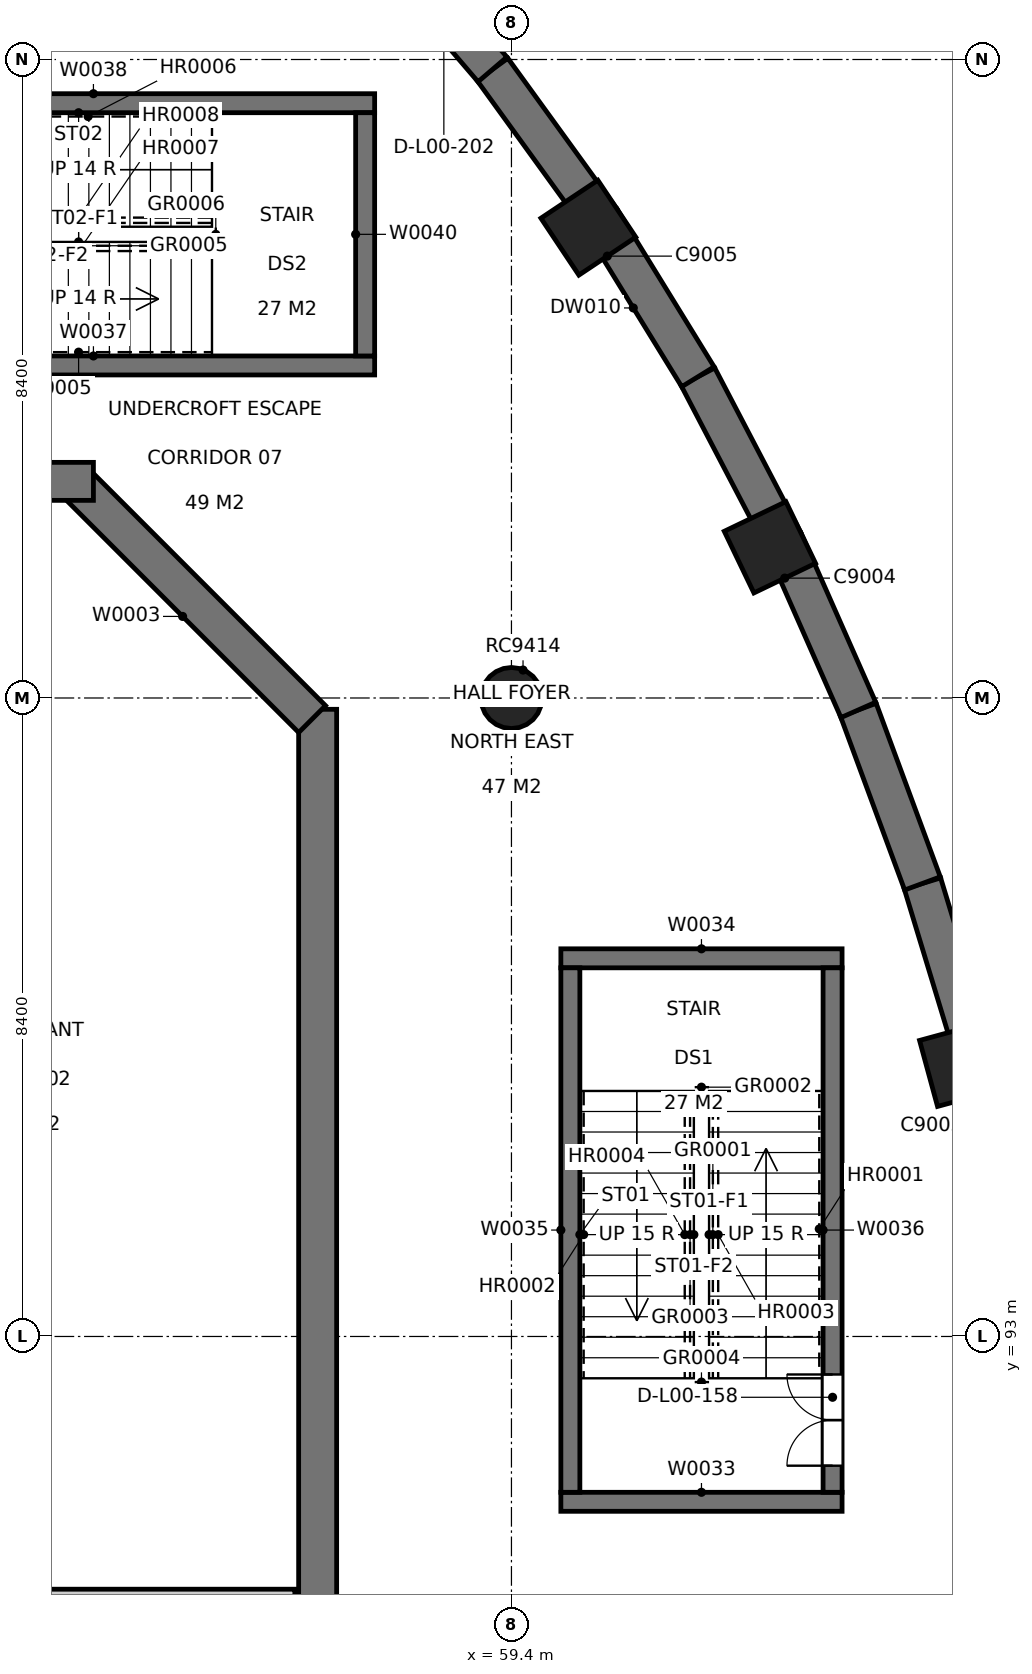
"""IFC4 building model, lengths in metres.
Left out: names, types, materials, properties, quantities, classifications, styles, units other than length and angle.
Written with IfcOpenShell. Run it as: python <this file> out.ifc"""

import sys

from ifc_helpers import new_model, si_unit, direction, frame, frame_2d, origin, origin_2d, place, context, subcontext, project, spatial, rectangle, circle, extrude, element, fill, save


model = new_model("IFC4")
c1 = context("Model", 3, precision=1e-05, world=origin(), true_north=direction((0.0, 1.0)))
c2 = subcontext(c1, "Body", "Model", "MODEL_VIEW")
j1 = project(units=[si_unit("LENGTHUNIT", "METRE"), si_unit("PLANEANGLEUNIT", "RADIAN")], contexts=[c1])
p1 = place(None, origin())
s1 = spatial("IfcSite", under=j1, at=p1, CompositionType="ELEMENT")
p2 = place(p1, origin())
s2 = spatial("IfcBuilding", under=s1, at=p2, CompositionType="ELEMENT")
p3 = place(p2, origin())
s3 = spatial("IfcBuildingStorey", under=s2, at=p3, CompositionType="ELEMENT", Elevation=0.0)
for number, where, z_axis, x_axis in (
    (1, (65.515, 96.631, 0.0), (0.0, 0.0, 1.0), (-0.291, 0.957, 0.0)),
    (2, (64.808, 98.96, 0.0), (0.0, 0.0, 1.0), (-0.347, 0.938, 0.0)),
):
    element("IfcWall", number, at=place(p3, frame(where, z_axis=z_axis, x_axis=x_axis)), inside=s3, PredefinedType="SOLIDWALL", context=c2, shape_type="SweptSolid", body=[
        extrude(rectangle(XDim=2.434, YDim=0.5, at=frame_2d((1.217, 0.0))), origin(), (0.0, 0.0, 1.0), 4.8),
    ])
p4 = place(p3, frame((63.964, 101.243, 0.0), z_axis=(0.0, 0.0, 1.0), x_axis=(-0.404089673612, 0.914719375371, 0.0)))
e3 = element("IfcWall", 3, at=p4, inside=s3, PredefinedType="SOLIDWALL", context=c2, shape_type="SweptSolid", body=[
    extrude(rectangle(XDim=2.434, YDim=0.5, at=frame_2d((1.217, 0.0))), origin(), (0.0, 0.0, 1.0), 4.8),
])
p5 = place(p3, frame((62.981, 103.469, 0.0), z_axis=(0.0, 0.0, 1.0), x_axis=(-0.463152141842, 0.886278789945, 0.0)))
e4 = element("IfcWall", 4, at=p5, inside=s3, PredefinedType="SOLIDWALL", context=c2, shape_type="SweptSolid", body=[
    extrude(rectangle(XDim=2.434, YDim=0.5, at=frame_2d((1.217, 0.0))), origin(), (0.0, 0.0, 1.0), 4.8),
])
p6 = place(p3, frame((61.854, 105.626, 0.0), z_axis=(0.0, 0.0, 1.0), x_axis=(-0.524097425664, 0.851658316705, 0.0)))
e5 = element("IfcWall", 5, at=p6, inside=s3, PredefinedType="SOLIDWALL", context=c2, shape_type="SweptSolid", body=[
    extrude(rectangle(XDim=2.434, YDim=0.5, at=frame_2d((1.217, 0.0))), origin(), (0.0, 0.0, 1.0), 4.8),
])
p7 = place(p3, frame((60.578, 107.699, 0.0), z_axis=(0.0, 0.0, 1.0), x_axis=(-0.586643688245, 0.809845159918, 0.0)))
e6 = element("IfcWall", 6, at=p7, inside=s3, PredefinedType="SOLIDWALL", context=c2, shape_type="SweptSolid", body=[
    extrude(rectangle(XDim=2.434, YDim=0.5, at=frame_2d((1.217, 0.0))), origin(), (0.0, 0.0, 1.0), 4.8),
])
p8 = place(p3, frame((59.15, 109.67, 0.0), z_axis=(0.0, 0.0, 1.0), x_axis=(-0.650526940133, 0.759483179643, 0.0)))
e7 = element("IfcWall", 7, at=p8, inside=s3, PredefinedType="SOLIDWALL", context=c2, shape_type="SweptSolid", body=[
    extrude(rectangle(XDim=2.433, YDim=0.5, at=frame_2d((1.217, 0.0))), origin(), (0.0, 0.0, 1.0), 4.8),
])
p9 = place(p8, frame((2.333, 0.0, 0.0), z_axis=(0.0, 0.0, 1.0), x_axis=(-1.0, 0.0, 0.0)))
e8 = element("IfcOpeningElement", 8, at=p9, cuts=e7, PredefinedType="OPENING", context=c2, shape_type="SweptSolid", body=[
    extrude(rectangle(XDim=1.8, YDim=2.1, at=frame_2d((0.9, 1.05))), frame((0.0, 0.26, 0.0), z_axis=(0.0, -1.0, 0.0), x_axis=(1.0, 0.0, 0.0)), (0.0, 0.0, 1.0), 0.52),
])
for number, where, z_axis, x_axis in (
    (9, (65.322, 96.579, 0.0), (0.0, 0.0, 1.0), (0.965, 0.263, 0.0)),
    (10, (62.801, 103.383, 0.0), (0.0, 0.0, 1.0), (0.901, 0.433, 0.0)),
    (11, (60.412, 107.588, 0.0), (0.0, 0.0, 1.0), (0.832, 0.555, 0.0)),
):
    element("IfcColumn", number, at=place(p3, frame(where, z_axis=z_axis, x_axis=x_axis)), inside=s3, PredefinedType="COLUMN", context=c2, shape_type="SweptSolid", body=[
        extrude(rectangle(XDim=0.9, YDim=0.9, at=origin_2d()), origin(), (0.0, 0.0, 1.0), 4.8),
    ])
p10 = place(p3, frame((59.4, 101.4, 0.0), z_axis=(0.0, 0.0, 1.0), x_axis=(1.0, 0.0, 0.0)))
e12 = element("IfcColumn", 12, at=p10, inside=s3, PredefinedType="COLUMN", context=c2, shape_type="SweptSolid", body=[
    extrude(circle(Radius=0.4, at=origin_2d()), origin(), (0.0, 0.0, 1.0), 4.8),
])
p11 = place(p3, frame((56.85, 63.1, 0.0), z_axis=(0.0, 0.0, 1.0), x_axis=(0.0, 1.0, 0.0)))
e13 = element("IfcWall", 13, at=p11, inside=s3, PredefinedType="SOLIDWALL", context=c2, shape_type="SweptSolid", body=[
    extrude(rectangle(XDim=38.151, YDim=0.5, at=frame_2d((19.076, 0.0))), origin(), (0.0, 0.0, 1.0), 4.8),
])
p12 = place(p11, frame((2.814, 0.0, 0.0)))
e14 = element("IfcOpeningElement", 14, at=p12, cuts=e13, PredefinedType="OPENING", context=c2, shape_type="SweptSolid", body=[
    extrude(rectangle(XDim=2.4, YDim=2.4, at=frame_2d((1.2, 1.2))), frame((0.0, 0.26, 0.0), z_axis=(0.0, -1.0, 0.0), x_axis=(1.0, 0.0, 0.0)), (0.0, 0.0, 1.0), 0.52),
])
p13 = place(p11, frame((6.402, 0.0, 0.0)))
e15 = element("IfcOpeningElement", 15, at=p13, cuts=e13, PredefinedType="OPENING", context=c2, shape_type="SweptSolid", body=[
    extrude(rectangle(XDim=2.4, YDim=2.4, at=frame_2d((1.2, 1.2))), frame((0.0, 0.26, 0.0), z_axis=(0.0, -1.0, 0.0), x_axis=(1.0, 0.0, 0.0)), (0.0, 0.0, 1.0), 0.52),
])
p14 = place(p3, frame((56.777, 101.123, 0.0), z_axis=(0.0, 0.0, 1.0), x_axis=(-0.707106781187, 0.707106781187, 0.0)))
e16 = element("IfcWall", 16, at=p14, inside=s3, PredefinedType="SOLIDWALL", context=c2, shape_type="SweptSolid", body=[
    extrude(rectangle(XDim=4.32, YDim=0.5, at=frame_2d((2.16, 0.0))), origin(), (0.0, 0.0, 1.0), 4.8),
])
p15 = place(p3, frame((53.9, 104.25, 0.0), z_axis=(0.0, 0.0, 1.0), x_axis=(-1.0, 0.0, 0.0)))
e17 = element("IfcWall", 17, at=p15, inside=s3, PredefinedType="SOLIDWALL", context=c2, shape_type="SweptSolid", body=[
    extrude(rectangle(XDim=22.6, YDim=0.5, at=frame_2d((11.3, 0.0))), origin(), (0.0, 0.0, 1.0), 4.8),
])
p16 = place(p15, frame((10.15, 0.0, 0.0)))
e18 = element("IfcOpeningElement", 18, at=p16, cuts=e17, PredefinedType="OPENING", context=c2, shape_type="SweptSolid", body=[
    extrude(rectangle(XDim=1.0, YDim=2.1, at=frame_2d((0.5, 1.05))), frame((0.0, 0.26, 0.0), z_axis=(0.0, -1.0, 0.0), x_axis=(1.0, 0.0, 0.0)), (0.0, 0.0, 1.0), 0.52),
])
for number, where, z_axis, x_axis in (
    (19, (60.05, 90.825, 0.0), (0.0, 0.0, 1.0), (1.0, 0.0, 0.0)),
    (20, (60.05, 97.975, 0.0), (0.0, 0.0, 1.0), (1.0, 0.0, 0.0)),
):
    element("IfcWall", number, at=place(p3, frame(where, z_axis=z_axis, x_axis=x_axis)), inside=s3, PredefinedType="SOLIDWALL", context=c2, shape_type="SweptSolid", body=[
        extrude(rectangle(XDim=3.7, YDim=0.25, at=frame_2d((1.85, 0.0))), origin(), (0.0, 0.0, 1.0), 4.8),
    ])
p17 = place(p3, frame((60.175, 90.95, 0.0), z_axis=(0.0, 0.0, 1.0), x_axis=(0.0, 1.0, 0.0)))
e21 = element("IfcWall", 21, at=p17, inside=s3, PredefinedType="SOLIDWALL", context=c2, shape_type="SweptSolid", body=[
    extrude(rectangle(XDim=6.9, YDim=0.25, at=frame_2d((3.45, 0.0))), origin(), (0.0, 0.0, 1.0), 4.8),
])
p18 = place(p3, frame((63.625, 90.95, 0.0), z_axis=(0.0, 0.0, 1.0), x_axis=(0.0, 1.0, 0.0)))
e22 = element("IfcWall", 22, at=p18, inside=s3, PredefinedType="SOLIDWALL", context=c2, shape_type="SweptSolid", body=[
    extrude(rectangle(XDim=6.9, YDim=0.25, at=frame_2d((3.45, 0.0))), origin(), (0.0, 0.0, 1.0), 4.8),
])
p19 = place(p18, frame((0.35, 0.0, 0.0)))
e23 = element("IfcOpeningElement", 23, at=p19, cuts=e22, PredefinedType="OPENING", context=c2, shape_type="SweptSolid", body=[
    extrude(rectangle(XDim=1.2, YDim=2.1, at=frame_2d((0.6, 1.05))), frame((0.0, 0.135, 0.0), z_axis=(0.0, -1.0, 0.0), x_axis=(1.0, 0.0, 0.0)), (0.0, 0.0, 1.0), 0.27),
])
p20 = place(p3, frame((50.2, 105.775, 0.0), z_axis=(0.0, 0.0, 1.0), x_axis=(1.0, 0.0, 0.0)))
e24 = element("IfcWall", 24, at=p20, inside=s3, PredefinedType="SOLIDWALL", context=c2, shape_type="SweptSolid", body=[
    extrude(rectangle(XDim=7.4, YDim=0.25, at=frame_2d((3.7, 0.0))), origin(), (0.0, 0.0, 1.0), 4.8),
])
p21 = place(p3, frame((50.2, 109.225, 0.0), z_axis=(0.0, 0.0, 1.0), x_axis=(1.0, 0.0, 0.0)))
e25 = element("IfcWall", 25, at=p21, inside=s3, PredefinedType="SOLIDWALL", context=c2, shape_type="SweptSolid", body=[
    extrude(rectangle(XDim=7.4, YDim=0.25, at=frame_2d((3.7, 0.0))), origin(), (0.0, 0.0, 1.0), 4.8),
])
p22 = place(p21, frame((0.7, 0.0, 0.0)))
e26 = element("IfcOpeningElement", 26, at=p22, cuts=e25, PredefinedType="OPENING", context=c2, shape_type="SweptSolid", body=[
    extrude(rectangle(XDim=1.2, YDim=2.1, at=frame_2d((0.6, 1.05))), frame((0.0, 0.135, 0.0), z_axis=(0.0, -1.0, 0.0), x_axis=(1.0, 0.0, 0.0)), (0.0, 0.0, 1.0), 0.27),
])
p23 = place(p3, frame((57.475, 105.9, 0.0), z_axis=(0.0, 0.0, 1.0), x_axis=(0.0, 1.0, 0.0)))
e27 = element("IfcWall", 27, at=p23, inside=s3, PredefinedType="SOLIDWALL", context=c2, shape_type="SweptSolid", body=[
    extrude(rectangle(XDim=3.2, YDim=0.25, at=frame_2d((1.6, 0.0))), origin(), (0.0, 0.0, 1.0), 4.8),
])
p24 = place(p3, frame((44.275, 89.6, 0.0), z_axis=(0.0, 0.0, 1.0), x_axis=(1.0, 0.0, 0.0)))
e28 = element("IfcWall", 28, at=p24, inside=s3, PredefinedType="PARTITIONING", context=c2, shape_type="SweptSolid", body=[
    extrude(rectangle(XDim=12.275, YDim=0.15, at=frame_2d((6.138, 0.0))), origin(), (0.0, 0.0, 1.0), 3.6),
])
p25 = place(p19, origin())
e29 = element("IfcDoor", 29, at=p25, inside=s3, OperationType="DOUBLE_DOOR_SINGLE_SWING", PredefinedType="DOOR", context=c2, shape_type="SweptSolid", body=[
    extrude(rectangle(XDim=1.2, YDim=2.1, at=frame_2d((0.6, 1.05))), frame((0.0, 0.025, 0.0), z_axis=(0.0, -1.0, 0.0), x_axis=(1.0, 0.0, 0.0)), (0.0, 0.0, 1.0), 0.05),
])
fill(e23, e29)
save(model, sys.argv[1])
